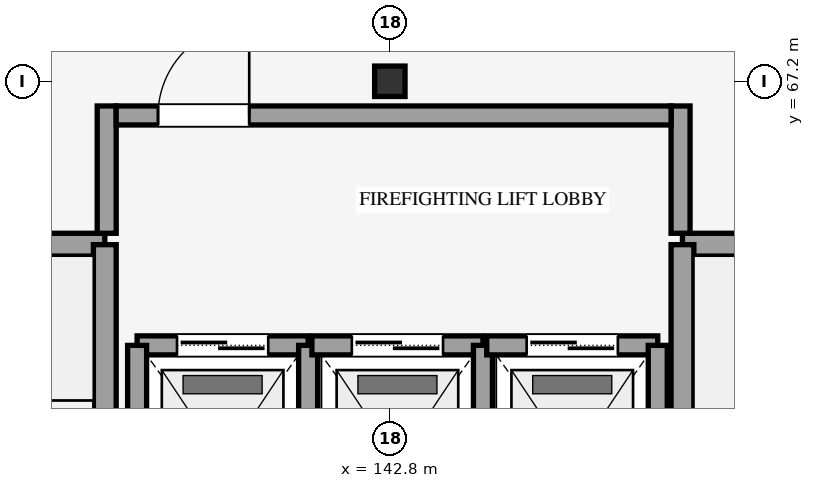
"""IFC4 building model, lengths in metres.
Left out: names, types, materials, properties, quantities, classifications, styles, units other than length and angle.
Written with IfcOpenShell. Run it as: python <this file> out.ifc"""

import sys

from ifc_helpers import new_model, si_unit, direction, frame, frame_2d, origin, origin_2d, place, context, subcontext, project, spatial, rectangle, i_section, extrude, element, fill, save


model = new_model("IFC4")
c1 = context("Model", 3, precision=1e-05, world=origin(), true_north=direction((0.0, 1.0)))
c2 = subcontext(c1, "Body", "Model", "MODEL_VIEW")
j1 = project(units=[si_unit("LENGTHUNIT", "METRE"), si_unit("PLANEANGLEUNIT", "RADIAN")], contexts=[c1])
p1 = place(None, origin())
s1 = spatial("IfcSite", under=j1, at=p1, CompositionType="ELEMENT")
p2 = place(p1, origin())
s2 = spatial("IfcBuilding", under=s1, at=p2, CompositionType="ELEMENT")
p3 = place(p2, frame((0.0, 0.0, 14.4)))
s3 = spatial("IfcBuildingStorey", under=s2, at=p3, CompositionType="ELEMENT", Elevation=14.4)
p4 = place(p3, frame((142.8, 67.2, 0.0), z_axis=(0.0, 0.0, 1.0), x_axis=(1.0, 0.0, 0.0)))
e1 = element("IfcColumn", 1, at=p4, inside=s3, PredefinedType="COLUMN", context=c2, shape_type="SweptSolid", body=[
    extrude(i_section(OverallWidth=0.4, OverallDepth=0.4, WebThickness=0.013, FlangeThickness=0.021, FilletRadius=0.022, at=origin_2d()), origin(), (0.0, 0.0, 1.0), 4.5),
])
p5 = place(p3, frame((135.05, 65.05, 0.0), z_axis=(0.0, 0.0, 1.0), x_axis=(1.0, 0.0, 0.0)))
e2 = element("IfcWall", 2, at=p5, inside=s3, PredefinedType="SHEAR", context=c2, shape_type="SweptSolid", body=[
    extrude(rectangle(XDim=4.0, YDim=0.3, at=frame_2d((2.0, 0.0))), origin(), (0.0, 0.0, 1.0), 4.5),
])
p6 = place(p3, frame((139.05, 50.75, 0.0), z_axis=(0.0, 0.0, 1.0), x_axis=(0.0, 1.0, 0.0)))
e3 = element("IfcWall", 3, at=p6, inside=s3, PredefinedType="SHEAR", context=c2, shape_type="SweptSolid", body=[
    extrude(rectangle(XDim=14.3, YDim=0.3, at=frame_2d((7.15, 0.0))), origin(), (0.0, 0.0, 1.0), 4.5),
])
p7 = place(p3, frame((146.65, 65.05, 0.0), z_axis=(0.0, 0.0, 1.0), x_axis=(1.0, 0.0, 0.0)))
e4 = element("IfcWall", 4, at=p7, inside=s3, PredefinedType="SHEAR", context=c2, shape_type="SweptSolid", body=[
    extrude(rectangle(XDim=4.0, YDim=0.3, at=frame_2d((2.0, 0.0))), origin(), (0.0, 0.0, 1.0), 4.5),
])
p8 = place(p3, frame((146.65, 50.75, 0.0), z_axis=(0.0, 0.0, 1.0), x_axis=(0.0, 1.0, 0.0)))
e5 = element("IfcWall", 5, at=p8, inside=s3, PredefinedType="SHEAR", context=c2, shape_type="SweptSolid", body=[
    extrude(rectangle(XDim=14.3, YDim=0.3, at=frame_2d((7.15, 0.0))), origin(), (0.0, 0.0, 1.0), 4.5),
])
p9 = place(p3, frame((139.475, 63.725, 0.0), z_axis=(0.0, 0.0, 1.0), x_axis=(1.0, 0.0, 0.0)))
e6 = element("IfcWall", 6, at=p9, inside=s3, PredefinedType="SHEAR", context=c2, shape_type="SweptSolid", body=[
    extrude(rectangle(XDim=2.25, YDim=0.25, at=frame_2d((1.125, 0.0))), origin(), (0.0, 0.0, 1.0), 4.24),
])
p10 = place(p9, frame((0.525, 0.0, 0.0)))
e7 = element("IfcOpeningElement", 7, at=p10, cuts=e6, PredefinedType="OPENING", context=c2, shape_type="SweptSolid", body=[
    extrude(rectangle(XDim=1.2, YDim=2.18, at=frame_2d((0.6, 1.09))), frame((0.0, 0.135, 0.0), z_axis=(0.0, -1.0, 0.0), x_axis=(1.0, 0.0, 0.0)), (0.0, 0.0, 1.0), 0.27),
])
for number, where, z_axis, x_axis in (
    (8, (139.475, 60.675, 0.0), (0.0, 0.0, 1.0), (0.0, 1.0, 0.0)),
    (9, (141.725, 60.675, 0.0), (0.0, 0.0, 1.0), (0.0, 1.0, 0.0)),
):
    element("IfcWall", number, at=place(p3, frame(where, z_axis=z_axis, x_axis=x_axis)), inside=s3, PredefinedType="SHEAR", context=c2, shape_type="SweptSolid", body=[
        extrude(rectangle(XDim=3.05, YDim=0.25, at=frame_2d((1.525, 0.0))), origin(), (0.0, 0.0, 1.0), 4.24),
    ])
p11 = place(p3, frame((141.775, 63.725, 0.0), z_axis=(0.0, 0.0, 1.0), x_axis=(1.0, 0.0, 0.0)))
e10 = element("IfcWall", 10, at=p11, inside=s3, PredefinedType="SHEAR", context=c2, shape_type="SweptSolid", body=[
    extrude(rectangle(XDim=2.25, YDim=0.25, at=frame_2d((1.125, 0.0))), origin(), (0.0, 0.0, 1.0), 4.24),
])
p12 = place(p11, frame((0.525, 0.0, 0.0)))
e11 = element("IfcOpeningElement", 11, at=p12, cuts=e10, PredefinedType="OPENING", context=c2, shape_type="SweptSolid", body=[
    extrude(rectangle(XDim=1.2, YDim=2.18, at=frame_2d((0.6, 1.09))), frame((0.0, 0.135, 0.0), z_axis=(0.0, -1.0, 0.0), x_axis=(1.0, 0.0, 0.0)), (0.0, 0.0, 1.0), 0.27),
])
p13 = place(p3, frame((144.025, 60.675, 0.0), z_axis=(0.0, 0.0, 1.0), x_axis=(0.0, 1.0, 0.0)))
e12 = element("IfcWall", 12, at=p13, inside=s3, PredefinedType="SHEAR", context=c2, shape_type="SweptSolid", body=[
    extrude(rectangle(XDim=3.05, YDim=0.25, at=frame_2d((1.525, 0.0))), origin(), (0.0, 0.0, 1.0), 4.24),
])
p14 = place(p3, frame((144.075, 63.725, 0.0), z_axis=(0.0, 0.0, 1.0), x_axis=(1.0, 0.0, 0.0)))
e13 = element("IfcWall", 13, at=p14, inside=s3, PredefinedType="SHEAR", context=c2, shape_type="SweptSolid", body=[
    extrude(rectangle(XDim=2.25, YDim=0.25, at=frame_2d((1.125, 0.0))), origin(), (0.0, 0.0, 1.0), 4.24),
])
p15 = place(p14, frame((0.525, 0.0, 0.0)))
e14 = element("IfcOpeningElement", 14, at=p15, cuts=e13, PredefinedType="OPENING", context=c2, shape_type="SweptSolid", body=[
    extrude(rectangle(XDim=1.2, YDim=2.18, at=frame_2d((0.6, 1.09))), frame((0.0, 0.135, 0.0), z_axis=(0.0, -1.0, 0.0), x_axis=(1.0, 0.0, 0.0)), (0.0, 0.0, 1.0), 0.27),
])
p16 = place(p3, frame((146.325, 60.675, 0.0), z_axis=(0.0, 0.0, 1.0), x_axis=(0.0, 1.0, 0.0)))
e15 = element("IfcWall", 15, at=p16, inside=s3, PredefinedType="SHEAR", context=c2, shape_type="SweptSolid", body=[
    extrude(rectangle(XDim=3.05, YDim=0.25, at=frame_2d((1.525, 0.0))), origin(), (0.0, 0.0, 1.0), 4.24),
])
for number, where, z_axis, x_axis in (
    (16, (139.075, 65.2, 0.0), (0.0, 0.0, 1.0), (0.0, 1.0, 0.0)),
    (17, (146.625, 65.2, 0.0), (0.0, 0.0, 1.0), (0.0, 1.0, 0.0)),
):
    element("IfcWall", number, at=place(p3, frame(where, z_axis=z_axis, x_axis=x_axis)), inside=s3, PredefinedType="SHEAR", context=c2, shape_type="SweptSolid", body=[
        extrude(rectangle(XDim=1.675, YDim=0.25, at=frame_2d((0.837, 0.0))), origin(), (0.0, 0.0, 1.0), 4.24),
    ])
p17 = place(p3, frame((139.2, 66.75, 0.0), z_axis=(0.0, 0.0, 1.0), x_axis=(1.0, 0.0, 0.0)))
e18 = element("IfcWall", 18, at=p17, inside=s3, PredefinedType="SHEAR", context=c2, shape_type="SweptSolid", body=[
    extrude(rectangle(XDim=7.3, YDim=0.25, at=frame_2d((3.65, 0.0))), origin(), (0.0, 0.0, 1.0), 4.24),
])
p18 = place(p17, frame((0.55, 0.0, 0.0)))
e19 = element("IfcOpeningElement", 19, at=p18, cuts=e18, PredefinedType="OPENING", context=c2, shape_type="SweptSolid", body=[
    extrude(rectangle(XDim=1.2, YDim=2.15, at=frame_2d((0.6, 1.075))), frame((0.0, 0.135, 0.0), z_axis=(0.0, -1.0, 0.0), x_axis=(1.0, 0.0, 0.0)), (0.0, 0.0, 1.0), 0.27),
])
p19 = place(p10, origin())
e20 = element("IfcDoor", 20, at=p19, inside=s3, OperationType="DOUBLE_DOOR_SLIDING", PredefinedType="DOOR", context=c2, shape_type="SweptSolid", body=[
    extrude(rectangle(XDim=1.2, YDim=2.18, at=frame_2d((0.6, 1.09))), frame((0.0, 0.025, 0.0), z_axis=(0.0, -1.0, 0.0), x_axis=(1.0, 0.0, 0.0)), (0.0, 0.0, 1.0), 0.05),
])
fill(e7, e20)
p20 = place(p12, origin())
e21 = element("IfcDoor", 21, at=p20, inside=s3, OperationType="DOUBLE_DOOR_SLIDING", PredefinedType="DOOR", context=c2, shape_type="SweptSolid", body=[
    extrude(rectangle(XDim=1.2, YDim=2.18, at=frame_2d((0.6, 1.09))), frame((0.0, 0.025, 0.0), z_axis=(0.0, -1.0, 0.0), x_axis=(1.0, 0.0, 0.0)), (0.0, 0.0, 1.0), 0.05),
])
fill(e11, e21)
p21 = place(p15, origin())
e22 = element("IfcDoor", 22, at=p21, inside=s3, OperationType="DOUBLE_DOOR_SLIDING", PredefinedType="DOOR", context=c2, shape_type="SweptSolid", body=[
    extrude(rectangle(XDim=1.2, YDim=2.18, at=frame_2d((0.6, 1.09))), frame((0.0, 0.025, 0.0), z_axis=(0.0, -1.0, 0.0), x_axis=(1.0, 0.0, 0.0)), (0.0, 0.0, 1.0), 0.05),
])
fill(e14, e22)
p22 = place(p18, origin())
e23 = element("IfcDoor", 23, at=p22, inside=s3, OperationType="SINGLE_SWING_RIGHT", PredefinedType="DOOR", context=c2, shape_type="SweptSolid", body=[
    extrude(rectangle(XDim=1.2, YDim=2.15, at=frame_2d((0.6, 1.075))), frame((0.0, 0.025, 0.0), z_axis=(0.0, -1.0, 0.0), x_axis=(1.0, 0.0, 0.0)), (0.0, 0.0, 1.0), 0.05),
])
fill(e19, e23)
save(model, sys.argv[1])
